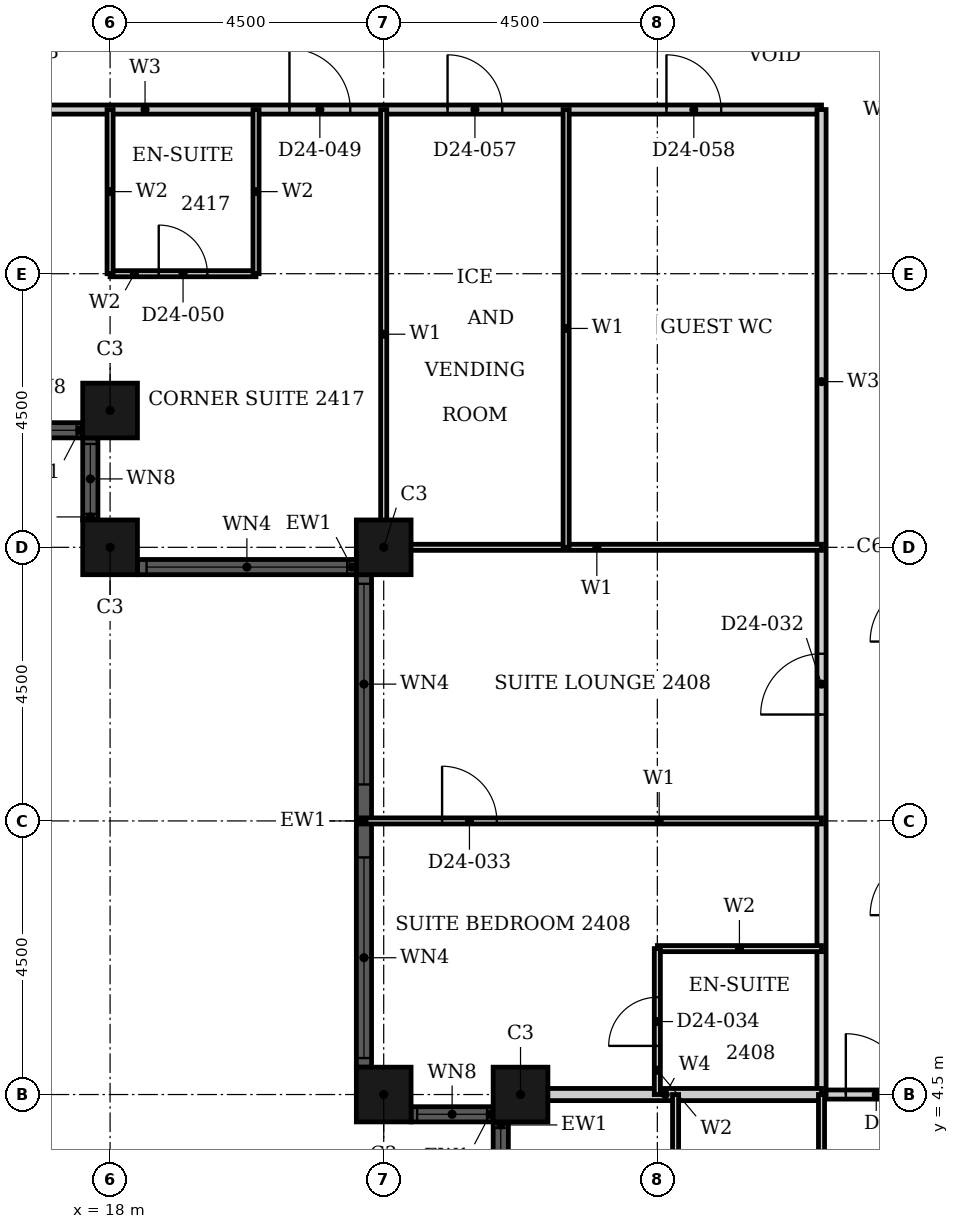
"""IFC4 building model, lengths in metres.
Left out: names, types, materials, properties, quantities, classifications, styles, units other than length and angle.
Written with IfcOpenShell. Run it as: python <this file> out.ifc"""

import sys

from ifc_helpers import new_model, si_unit, direction, frame, frame_2d, origin, origin_2d, place, context, subcontext, project, spatial, rectangle, hollow_rectangle, extrude, element, fill, save


model = new_model("IFC4")
c1 = context("Model", 3, precision=1e-05, world=origin(), true_north=direction((0.0, 1.0)))
c2 = subcontext(c1, "Body", "Model", "MODEL_VIEW")
j1 = project(units=[si_unit("LENGTHUNIT", "METRE"), si_unit("PLANEANGLEUNIT", "RADIAN")], contexts=[c1])
p1 = place(None, origin())
s1 = spatial("IfcSite", under=j1, at=p1, CompositionType="ELEMENT")
p2 = place(p1, origin())
s2 = spatial("IfcBuilding", under=s1, at=p2, CompositionType="ELEMENT")
p3 = place(p2, frame((0.0, 0.0, 100.8)))
s3 = spatial("IfcBuildingStorey", under=s2, at=p3, CompositionType="ELEMENT", Elevation=100.8)
for number, where, z_axis, x_axis in (
    (1, (22.5, 4.5, 0.0), (0.0, 0.0, 1.0), (1.0, 0.0, 0.0)),
    (2, (24.75, 4.5, 0.0), (0.0, 0.0, 1.0), (1.0, 0.0, 0.0)),
    (3, (18.0, 15.75, 0.0), (0.0, 0.0, 1.0), (1.0, 0.0, 0.0)),
    (4, (18.0, 13.5, 0.0), (0.0, 0.0, 1.0), (1.0, 0.0, 0.0)),
    (5, (22.5, 13.5, 0.0), (0.0, 0.0, 1.0), (1.0, 0.0, 0.0)),
):
    element("IfcColumn", number, at=place(p3, frame(where, z_axis=z_axis, x_axis=x_axis)), inside=s3, PredefinedType="COLUMN", context=c2, shape_type="SweptSolid", body=[
        extrude(hollow_rectangle(XDim=0.9, YDim=0.9, WallThickness=0.028, at=origin_2d()), origin(), (0.0, 0.0, 1.0), 3.6),
    ])
p4 = place(p3, frame((22.95, 4.175, 0.0), z_axis=(0.0, 0.0, 1.0), x_axis=(1.0, 0.0, 0.0)))
e6 = element("IfcWall", 6, at=p4, inside=s3, PredefinedType="SOLIDWALL", context=c2, shape_type="SweptSolid", body=[
    extrude(rectangle(XDim=1.35, YDim=0.25, at=frame_2d((0.675, 0.0))), origin(), (0.0, 0.0, 1.0), 3.6),
])
p5 = place(p4, frame((0.1, 0.0, 0.9)))
e7 = element("IfcOpeningElement", 7, at=p5, cuts=e6, PredefinedType="OPENING", context=c2, shape_type="SweptSolid", body=[
    extrude(rectangle(XDim=1.15, YDim=2.08, at=frame_2d((0.575, 1.04))), frame((0.0, 0.135, 0.0), z_axis=(0.0, -1.0, 0.0), x_axis=(1.0, 0.0, 0.0)), (0.0, 0.0, 1.0), 0.27),
])
p6 = place(p3, frame((24.425, 4.05, 0.0), z_axis=(0.0, 0.0, 1.0), x_axis=(0.0, -1.0, 0.0)))
e8 = element("IfcWall", 8, at=p6, inside=s3, PredefinedType="SOLIDWALL", context=c2, shape_type="SweptSolid", body=[
    extrude(rectangle(XDim=1.35, YDim=0.25, at=frame_2d((0.675, 0.0))), origin(), (0.0, 0.0, 1.0), 3.6),
])
p7 = place(p6, frame((0.1, 0.0, 0.9)))
e9 = element("IfcOpeningElement", 9, at=p7, cuts=e8, PredefinedType="OPENING", context=c2, shape_type="SweptSolid", body=[
    extrude(rectangle(XDim=1.15, YDim=2.08, at=frame_2d((0.575, 1.04))), frame((0.0, 0.135, 0.0), z_axis=(0.0, -1.0, 0.0), x_axis=(1.0, 0.0, 0.0)), (0.0, 0.0, 1.0), 0.27),
])
p8 = place(p3, frame((16.2, 15.425, 0.0), z_axis=(0.0, 0.0, 1.0), x_axis=(1.0, 0.0, 0.0)))
e10 = element("IfcWall", 10, at=p8, inside=s3, PredefinedType="SOLIDWALL", context=c2, shape_type="SweptSolid", body=[
    extrude(rectangle(XDim=1.35, YDim=0.25, at=frame_2d((0.675, 0.0))), origin(), (0.0, 0.0, 1.0), 3.6),
])
p9 = place(p8, frame((0.1, 0.0, 0.9)))
e11 = element("IfcOpeningElement", 11, at=p9, cuts=e10, PredefinedType="OPENING", context=c2, shape_type="SweptSolid", body=[
    extrude(rectangle(XDim=1.15, YDim=2.08, at=frame_2d((0.575, 1.04))), frame((0.0, 0.135, 0.0), z_axis=(0.0, -1.0, 0.0), x_axis=(1.0, 0.0, 0.0)), (0.0, 0.0, 1.0), 0.27),
])
p10 = place(p3, frame((17.675, 15.3, 0.0), z_axis=(0.0, 0.0, 1.0), x_axis=(0.0, -1.0, 0.0)))
e12 = element("IfcWall", 12, at=p10, inside=s3, PredefinedType="SOLIDWALL", context=c2, shape_type="SweptSolid", body=[
    extrude(rectangle(XDim=1.35, YDim=0.25, at=frame_2d((0.675, 0.0))), origin(), (0.0, 0.0, 1.0), 3.6),
])
p11 = place(p10, frame((0.1, 0.0, 0.9)))
e13 = element("IfcOpeningElement", 13, at=p11, cuts=e12, PredefinedType="OPENING", context=c2, shape_type="SweptSolid", body=[
    extrude(rectangle(XDim=1.15, YDim=2.08, at=frame_2d((0.575, 1.04))), frame((0.0, 0.135, 0.0), z_axis=(0.0, -1.0, 0.0), x_axis=(1.0, 0.0, 0.0)), (0.0, 0.0, 1.0), 0.27),
])
p12 = place(p3, frame((18.45, 13.175, 0.0), z_axis=(0.0, 0.0, 1.0), x_axis=(1.0, 0.0, 0.0)))
e14 = element("IfcWall", 14, at=p12, inside=s3, PredefinedType="SOLIDWALL", context=c2, shape_type="SweptSolid", body=[
    extrude(rectangle(XDim=3.6, YDim=0.25, at=frame_2d((1.8, 0.0))), origin(), (0.0, 0.0, 1.0), 3.6),
])
p13 = place(p12, frame((0.15, 0.0, 0.9)))
e15 = element("IfcOpeningElement", 15, at=p13, cuts=e14, PredefinedType="OPENING", context=c2, shape_type="SweptSolid", body=[
    extrude(rectangle(XDim=3.3, YDim=2.08, at=frame_2d((1.65, 1.04))), frame((0.0, 0.135, 0.0), z_axis=(0.0, -1.0, 0.0), x_axis=(1.0, 0.0, 0.0)), (0.0, 0.0, 1.0), 0.27),
])
p14 = place(p3, frame((22.175, 13.05, 0.0), z_axis=(0.0, 0.0, 1.0), x_axis=(0.0, -1.0, 0.0)))
e16 = element("IfcWall", 16, at=p14, inside=s3, PredefinedType="SOLIDWALL", context=c2, shape_type="SweptSolid", body=[
    extrude(rectangle(XDim=8.1, YDim=0.25, at=frame_2d((4.05, 0.0))), origin(), (0.0, 0.0, 1.0), 3.6),
])
p15 = place(p14, frame((0.15, 0.0, 0.9)))
e17 = element("IfcOpeningElement", 17, at=p15, cuts=e16, PredefinedType="OPENING", context=c2, shape_type="SweptSolid", body=[
    extrude(rectangle(XDim=3.3, YDim=2.08, at=frame_2d((1.65, 1.04))), frame((0.0, 0.135, 0.0), z_axis=(0.0, -1.0, 0.0), x_axis=(1.0, 0.0, 0.0)), (0.0, 0.0, 1.0), 0.27),
])
p16 = place(p14, frame((4.65, 0.0, 0.9)))
e18 = element("IfcOpeningElement", 18, at=p16, cuts=e16, PredefinedType="OPENING", context=c2, shape_type="SweptSolid", body=[
    extrude(rectangle(XDim=3.3, YDim=2.08, at=frame_2d((1.65, 1.04))), frame((0.0, 0.135, 0.0), z_axis=(0.0, -1.0, 0.0), x_axis=(1.0, 0.0, 0.0)), (0.0, 0.0, 1.0), 0.27),
])
p17 = place(p3, frame((16.2, 20.7, 0.0), z_axis=(0.0, 0.0, 1.0), x_axis=(1.0, 0.0, 0.0)))
e19 = element("IfcWall", 19, at=p17, inside=s3, PredefinedType="PARTITIONING", context=c2, shape_type="SweptSolid", body=[
    extrude(rectangle(XDim=13.5, YDim=0.15, at=frame_2d((6.75, 0.0))), origin(), (0.0, 0.0, 1.0), 3.3),
])
p18 = place(p17, frame((4.75, 0.0, 0.0)))
e20 = element("IfcOpeningElement", 20, at=p18, cuts=e19, PredefinedType="OPENING", context=c2, shape_type="SweptSolid", body=[
    extrude(rectangle(XDim=1.0, YDim=2.1, at=frame_2d((0.5, 1.05))), frame((0.0, 0.085, 0.0), z_axis=(0.0, -1.0, 0.0), x_axis=(1.0, 0.0, 0.0)), (0.0, 0.0, 1.0), 0.17),
])
p19 = place(p17, frame((7.35, 0.0, 0.0)))
e21 = element("IfcOpeningElement", 21, at=p19, cuts=e19, PredefinedType="OPENING", context=c2, shape_type="SweptSolid", body=[
    extrude(rectangle(XDim=0.9, YDim=2.1, at=frame_2d((0.45, 1.05))), frame((0.0, 0.085, 0.0), z_axis=(0.0, -1.0, 0.0), x_axis=(1.0, 0.0, 0.0)), (0.0, 0.0, 1.0), 0.17),
])
p20 = place(p17, frame((10.95, 0.0, 0.0)))
e22 = element("IfcOpeningElement", 22, at=p20, cuts=e19, PredefinedType="OPENING", context=c2, shape_type="SweptSolid", body=[
    extrude(rectangle(XDim=0.9, YDim=2.1, at=frame_2d((0.45, 1.05))), frame((0.0, 0.085, 0.0), z_axis=(0.0, -1.0, 0.0), x_axis=(1.0, 0.0, 0.0)), (0.0, 0.0, 1.0), 0.17),
])
p21 = place(p3, frame((29.7, 4.5, 0.0), z_axis=(0.0, 0.0, 1.0), x_axis=(1.0, 0.0, 0.0)))
e23 = element("IfcWall", 23, at=p21, inside=s3, PredefinedType="PARTITIONING", context=c2, shape_type="SweptSolid", body=[
    extrude(rectangle(XDim=1.8, YDim=0.15, at=frame_2d((0.9, 0.0))), origin(), (0.0, 0.0, 1.0), 3.3),
])
p22 = place(p21, frame((0.4, 0.0, 0.0)))
e24 = element("IfcOpeningElement", 24, at=p22, cuts=e23, PredefinedType="OPENING", context=c2, shape_type="SweptSolid", body=[
    extrude(rectangle(XDim=1.0, YDim=2.1, at=frame_2d((0.5, 1.05))), frame((0.0, 0.085, 0.0), z_axis=(0.0, -1.0, 0.0), x_axis=(1.0, 0.0, 0.0)), (0.0, 0.0, 1.0), 0.17),
])
p23 = place(p3, frame((29.7, 4.5, 0.0), z_axis=(0.0, 0.0, 1.0), x_axis=(0.0, 1.0, 0.0)))
e25 = element("IfcWall", 25, at=p23, inside=s3, PredefinedType="PARTITIONING", context=c2, shape_type="SweptSolid", body=[
    extrude(rectangle(XDim=16.2, YDim=0.15, at=frame_2d((8.1, 0.0))), origin(), (0.0, 0.0, 1.0), 3.3),
])
p24 = place(p23, frame((6.25, 0.0, 0.0)))
e26 = element("IfcOpeningElement", 26, at=p24, cuts=e25, PredefinedType="OPENING", context=c2, shape_type="SweptSolid", body=[
    extrude(rectangle(XDim=1.0, YDim=2.1, at=frame_2d((0.5, 1.05))), frame((0.0, 0.085, 0.0), z_axis=(0.0, -1.0, 0.0), x_axis=(1.0, 0.0, 0.0)), (0.0, 0.0, 1.0), 0.17),
])
p25 = place(p3, frame((22.31, 13.5, 0.0), z_axis=(0.0, 0.0, 1.0), x_axis=(1.0, 0.0, 0.0)))
e27 = element("IfcWall", 27, at=p25, inside=s3, PredefinedType="PARTITIONING", context=c2, shape_type="SweptSolid", body=[
    extrude(rectangle(XDim=7.39, YDim=0.1, at=frame_2d((3.695, 0.0))), origin(), (0.0, 0.0, 1.0), 2.38),
])
p26 = place(p3, frame((22.11, 9.0, 0.0), z_axis=(0.0, 0.0, 1.0), x_axis=(1.0, 0.0, 0.0)))
e28 = element("IfcWall", 28, at=p26, inside=s3, PredefinedType="PARTITIONING", context=c2, shape_type="SweptSolid", body=[
    extrude(rectangle(XDim=7.59, YDim=0.1, at=frame_2d((3.795, 0.0))), origin(), (0.0, 0.0, 1.0), 3.3),
])
p27 = place(p26, frame((1.35, 0.0, 0.0)))
e29 = element("IfcOpeningElement", 29, at=p27, cuts=e28, PredefinedType="OPENING", context=c2, shape_type="SweptSolid", body=[
    extrude(rectangle(XDim=0.9, YDim=2.1, at=frame_2d((0.45, 1.05))), frame((0.0, 0.06, 0.0), z_axis=(0.0, -1.0, 0.0), x_axis=(1.0, 0.0, 0.0)), (0.0, 0.0, 1.0), 0.12),
])
p28 = place(p3, frame((22.5, 13.31, 0.0), z_axis=(0.0, 0.0, 1.0), x_axis=(0.0, 1.0, 0.0)))
e30 = element("IfcWall", 30, at=p28, inside=s3, PredefinedType="PARTITIONING", context=c2, shape_type="SweptSolid", body=[
    extrude(rectangle(XDim=7.39, YDim=0.1, at=frame_2d((3.695, 0.0))), origin(), (0.0, 0.0, 1.0), 3.3),
])
p29 = place(p3, frame((25.5, 13.5, 0.0), z_axis=(0.0, 0.0, 1.0), x_axis=(0.0, 1.0, 0.0)))
e31 = element("IfcWall", 31, at=p29, inside=s3, PredefinedType="PARTITIONING", context=c2, shape_type="SweptSolid", body=[
    extrude(rectangle(XDim=7.2, YDim=0.1, at=frame_2d((3.6, 0.0))), origin(), (0.0, 0.0, 1.0), 3.3),
])
p30 = place(p3, frame((24.56, 4.5, 0.0), z_axis=(0.0, 0.0, 1.0), x_axis=(1.0, 0.0, 0.0)))
e32 = element("IfcWall", 32, at=p30, inside=s3, PredefinedType="PARTITIONING", context=c2, shape_type="SweptSolid", body=[
    extrude(rectangle(XDim=5.14, YDim=0.2, at=frame_2d((2.57, 0.0))), origin(), (0.0, 0.0, 1.0), 3.3),
])
p31 = place(p3, frame((18.0, 18.0, 0.0), z_axis=(0.0, 0.0, 1.0), x_axis=(1.0, 0.0, 0.0)))
e33 = element("IfcWall", 33, at=p31, inside=s3, PredefinedType="PARTITIONING", context=c2, shape_type="SweptSolid", body=[
    extrude(rectangle(XDim=2.4, YDim=0.1, at=frame_2d((1.2, 0.0))), origin(), (0.0, 0.0, 1.0), 3.3),
])
p32 = place(p31, frame((0.8, 0.0, 0.0)))
e34 = element("IfcOpeningElement", 34, at=p32, cuts=e33, PredefinedType="OPENING", context=c2, shape_type="SweptSolid", body=[
    extrude(rectangle(XDim=0.8, YDim=2.1, at=frame_2d((0.4, 1.05))), frame((0.0, 0.06, 0.0), z_axis=(0.0, -1.0, 0.0), x_axis=(1.0, 0.0, 0.0)), (0.0, 0.0, 1.0), 0.12),
])
for number, where, z_axis, x_axis in (
    (35, (27.0, 6.9, 0.0), (0.0, 0.0, 1.0), (1.0, 0.0, 0.0)),
    (36, (18.0, 18.0, 0.0), (0.0, 0.0, 1.0), (0.0, 1.0, 0.0)),
    (37, (20.4, 18.0, 0.0), (0.0, 0.0, 1.0), (0.0, 1.0, 0.0)),
):
    element("IfcWall", number, at=place(p3, frame(where, z_axis=z_axis, x_axis=x_axis)), inside=s3, PredefinedType="PARTITIONING", context=c2, shape_type="SweptSolid", body=[
        extrude(rectangle(XDim=2.7, YDim=0.1, at=frame_2d((1.35, 0.0))), origin(), (0.0, 0.0, 1.0), 3.3),
    ])
p33 = place(p3, frame((27.0, 4.5, 0.0), z_axis=(0.0, 0.0, 1.0), x_axis=(0.0, 1.0, 0.0)))
e38 = element("IfcWall", 38, at=p33, inside=s3, PredefinedType="PARTITIONING", context=c2, shape_type="SweptSolid", body=[
    extrude(rectangle(XDim=2.4, YDim=0.1, at=frame_2d((1.2, 0.0))), origin(), (0.0, 0.0, 1.0), 2.58),
])
p34 = place(p33, frame((0.8, 0.0, 0.0)))
e39 = element("IfcOpeningElement", 39, at=p34, cuts=e38, PredefinedType="OPENING", context=c2, shape_type="SweptSolid", body=[
    extrude(rectangle(XDim=0.8, YDim=2.1, at=frame_2d((0.4, 1.05))), frame((0.0, 0.06, 0.0), z_axis=(0.0, -1.0, 0.0), x_axis=(1.0, 0.0, 0.0)), (0.0, 0.0, 1.0), 0.12),
])
for number, where, z_axis, x_axis in (
    (40, (27.3, 1.8, 0.0), (0.0, 0.0, 1.0), (0.0, 1.0, 0.0)),
    (41, (29.7, 1.8, 0.0), (0.0, 0.0, 1.0), (0.0, 1.0, 0.0)),
):
    element("IfcWall", number, at=place(p3, frame(where, z_axis=z_axis, x_axis=x_axis)), inside=s3, PredefinedType="PARTITIONING", context=c2, shape_type="SweptSolid", body=[
        extrude(rectangle(XDim=2.7, YDim=0.1, at=frame_2d((1.35, 0.0))), origin(), (0.0, 0.0, 1.0), 3.3),
    ])
p35 = place(p5, origin())
e42 = element("IfcWindow", 42, at=p35, inside=s3, PartitioningType="SINGLE_PANEL", PredefinedType="WINDOW", context=c2, shape_type="SweptSolid", body=[
    extrude(rectangle(XDim=1.15, YDim=2.08, at=frame_2d((0.575, 1.04))), frame((0.0, 0.03, 0.0), z_axis=(0.0, -1.0, 0.0), x_axis=(1.0, 0.0, 0.0)), (0.0, 0.0, 1.0), 0.06),
])
fill(e7, e42)
p36 = place(p7, origin())
e43 = element("IfcWindow", 43, at=p36, inside=s3, PartitioningType="SINGLE_PANEL", PredefinedType="WINDOW", context=c2, shape_type="SweptSolid", body=[
    extrude(rectangle(XDim=1.15, YDim=2.08, at=frame_2d((0.575, 1.04))), frame((0.0, 0.03, 0.0), z_axis=(0.0, -1.0, 0.0), x_axis=(1.0, 0.0, 0.0)), (0.0, 0.0, 1.0), 0.06),
])
fill(e9, e43)
p37 = place(p9, origin())
e44 = element("IfcWindow", 44, at=p37, inside=s3, PartitioningType="SINGLE_PANEL", PredefinedType="WINDOW", context=c2, shape_type="SweptSolid", body=[
    extrude(rectangle(XDim=1.15, YDim=2.08, at=frame_2d((0.575, 1.04))), frame((0.0, 0.03, 0.0), z_axis=(0.0, -1.0, 0.0), x_axis=(1.0, 0.0, 0.0)), (0.0, 0.0, 1.0), 0.06),
])
fill(e11, e44)
p38 = place(p11, origin())
e45 = element("IfcWindow", 45, at=p38, inside=s3, PartitioningType="SINGLE_PANEL", PredefinedType="WINDOW", context=c2, shape_type="SweptSolid", body=[
    extrude(rectangle(XDim=1.15, YDim=2.08, at=frame_2d((0.575, 1.04))), frame((0.0, 0.03, 0.0), z_axis=(0.0, -1.0, 0.0), x_axis=(1.0, 0.0, 0.0)), (0.0, 0.0, 1.0), 0.06),
])
fill(e13, e45)
p39 = place(p13, origin())
e46 = element("IfcWindow", 46, at=p39, inside=s3, PartitioningType="SINGLE_PANEL", PredefinedType="WINDOW", context=c2, shape_type="SweptSolid", body=[
    extrude(rectangle(XDim=3.3, YDim=2.08, at=frame_2d((1.65, 1.04))), frame((0.0, 0.03, 0.0), z_axis=(0.0, -1.0, 0.0), x_axis=(1.0, 0.0, 0.0)), (0.0, 0.0, 1.0), 0.06),
])
fill(e15, e46)
p40 = place(p15, origin())
e47 = element("IfcWindow", 47, at=p40, inside=s3, PartitioningType="SINGLE_PANEL", PredefinedType="WINDOW", context=c2, shape_type="SweptSolid", body=[
    extrude(rectangle(XDim=3.3, YDim=2.08, at=frame_2d((1.65, 1.04))), frame((0.0, 0.03, 0.0), z_axis=(0.0, -1.0, 0.0), x_axis=(1.0, 0.0, 0.0)), (0.0, 0.0, 1.0), 0.06),
])
fill(e17, e47)
p41 = place(p16, origin())
e48 = element("IfcWindow", 48, at=p41, inside=s3, PartitioningType="SINGLE_PANEL", PredefinedType="WINDOW", context=c2, shape_type="SweptSolid", body=[
    extrude(rectangle(XDim=3.3, YDim=2.08, at=frame_2d((1.65, 1.04))), frame((0.0, 0.03, 0.0), z_axis=(0.0, -1.0, 0.0), x_axis=(1.0, 0.0, 0.0)), (0.0, 0.0, 1.0), 0.06),
])
fill(e18, e48)
p42 = place(p24, origin())
e49 = element("IfcDoor", 49, at=p42, inside=s3, OperationType="SINGLE_SWING_RIGHT", PredefinedType="DOOR", context=c2, shape_type="SweptSolid", body=[
    extrude(rectangle(XDim=1.0, YDim=2.1, at=frame_2d((0.5, 1.05))), frame((0.0, 0.025, 0.0), z_axis=(0.0, -1.0, 0.0), x_axis=(1.0, 0.0, 0.0)), (0.0, 0.0, 1.0), 0.05),
])
fill(e26, e49)
p43 = place(p27, origin())
e50 = element("IfcDoor", 50, at=p43, inside=s3, OperationType="SINGLE_SWING_LEFT", PredefinedType="DOOR", context=c2, shape_type="SweptSolid", body=[
    extrude(rectangle(XDim=0.9, YDim=2.1, at=frame_2d((0.45, 1.05))), frame((0.0, 0.025, 0.0), z_axis=(0.0, -1.0, 0.0), x_axis=(1.0, 0.0, 0.0)), (0.0, 0.0, 1.0), 0.05),
])
fill(e29, e50)
p44 = place(p34, origin())
e51 = element("IfcDoor", 51, at=p44, inside=s3, OperationType="SINGLE_SWING_LEFT", PredefinedType="DOOR", context=c2, shape_type="SweptSolid", body=[
    extrude(rectangle(XDim=0.8, YDim=2.1, at=frame_2d((0.4, 1.05))), frame((0.0, 0.025, 0.0), z_axis=(0.0, -1.0, 0.0), x_axis=(1.0, 0.0, 0.0)), (0.0, 0.0, 1.0), 0.05),
])
fill(e39, e51)
p45 = place(p22, origin())
e52 = element("IfcDoor", 52, at=p45, inside=s3, OperationType="SINGLE_SWING_RIGHT", PredefinedType="DOOR", context=c2, shape_type="SweptSolid", body=[
    extrude(rectangle(XDim=1.0, YDim=2.1, at=frame_2d((0.5, 1.05))), frame((0.0, 0.025, 0.0), z_axis=(0.0, -1.0, 0.0), x_axis=(1.0, 0.0, 0.0)), (0.0, 0.0, 1.0), 0.05),
])
fill(e24, e52)
p46 = place(p18, origin())
e53 = element("IfcDoor", 53, at=p46, inside=s3, OperationType="SINGLE_SWING_RIGHT", PredefinedType="DOOR", context=c2, shape_type="SweptSolid", body=[
    extrude(rectangle(XDim=1.0, YDim=2.1, at=frame_2d((0.5, 1.05))), frame((0.0, 0.025, 0.0), z_axis=(0.0, -1.0, 0.0), x_axis=(1.0, 0.0, 0.0)), (0.0, 0.0, 1.0), 0.05),
])
fill(e20, e53)
p47 = place(p32, origin())
e54 = element("IfcDoor", 54, at=p47, inside=s3, OperationType="SINGLE_SWING_LEFT", PredefinedType="DOOR", context=c2, shape_type="SweptSolid", body=[
    extrude(rectangle(XDim=0.8, YDim=2.1, at=frame_2d((0.4, 1.05))), frame((0.0, 0.025, 0.0), z_axis=(0.0, -1.0, 0.0), x_axis=(1.0, 0.0, 0.0)), (0.0, 0.0, 1.0), 0.05),
])
fill(e34, e54)
p48 = place(p19, origin())
e55 = element("IfcDoor", 55, at=p48, inside=s3, OperationType="SINGLE_SWING_LEFT", PredefinedType="DOOR", context=c2, shape_type="SweptSolid", body=[
    extrude(rectangle(XDim=0.9, YDim=2.1, at=frame_2d((0.45, 1.05))), frame((0.0, 0.025, 0.0), z_axis=(0.0, -1.0, 0.0), x_axis=(1.0, 0.0, 0.0)), (0.0, 0.0, 1.0), 0.05),
])
fill(e21, e55)
p49 = place(p20, origin())
e56 = element("IfcDoor", 56, at=p49, inside=s3, OperationType="SINGLE_SWING_LEFT", PredefinedType="DOOR", context=c2, shape_type="SweptSolid", body=[
    extrude(rectangle(XDim=0.9, YDim=2.1, at=frame_2d((0.45, 1.05))), frame((0.0, 0.025, 0.0), z_axis=(0.0, -1.0, 0.0), x_axis=(1.0, 0.0, 0.0)), (0.0, 0.0, 1.0), 0.05),
])
fill(e22, e56)
save(model, sys.argv[1])
